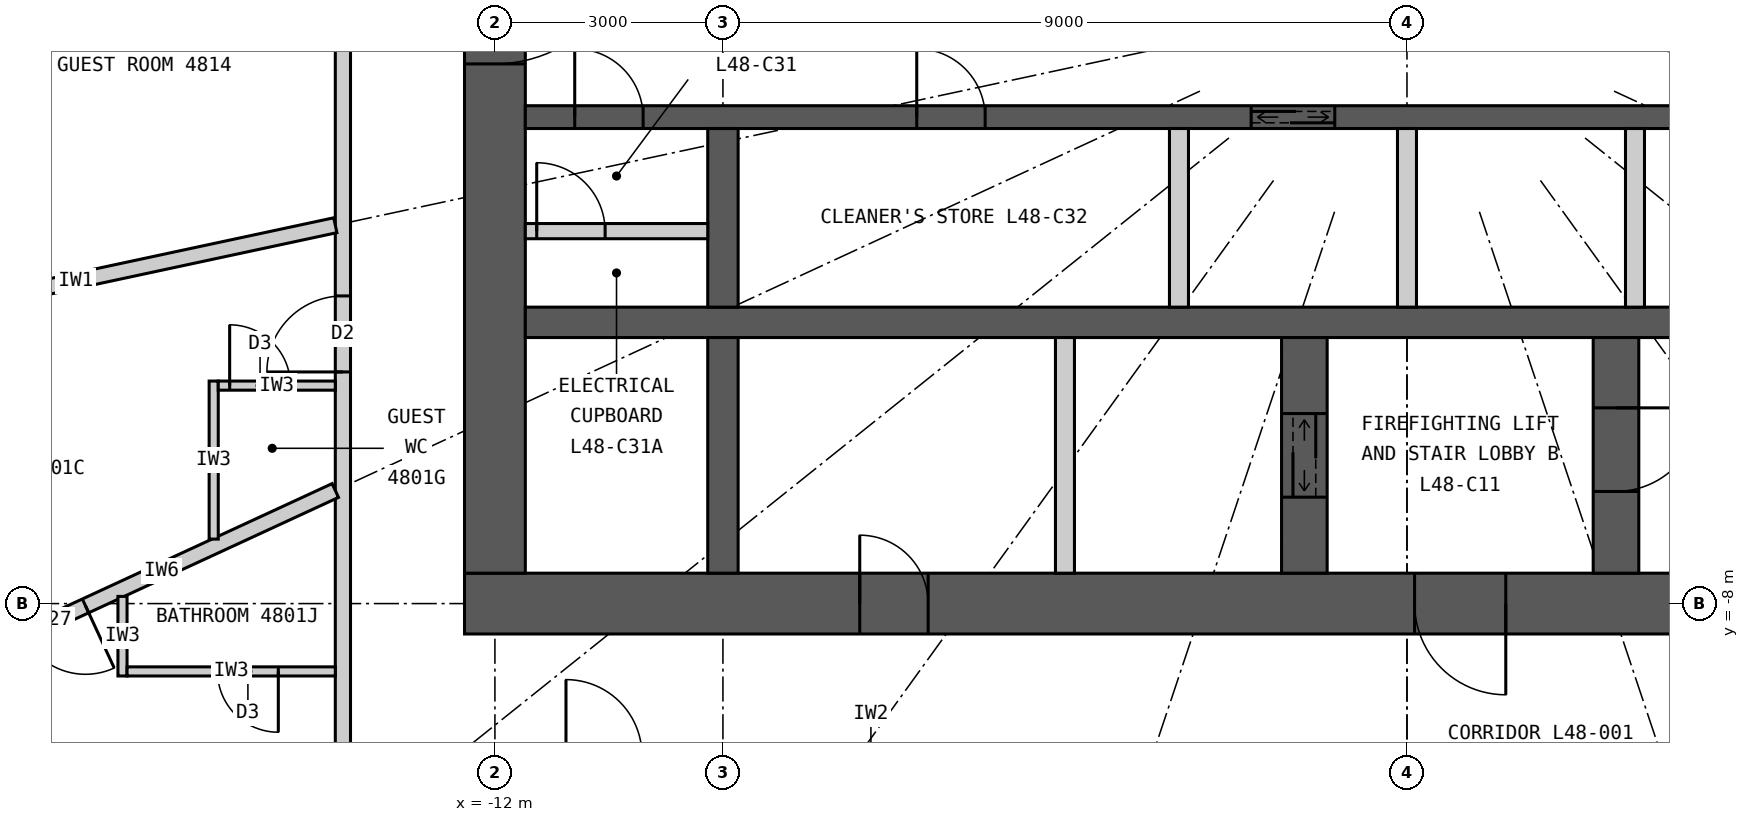
"""IFC4 building model, lengths in metres.
Left out: names, types, materials, properties, quantities, classifications, styles, units other than length and angle.
Written with IfcOpenShell. Run it as: python <this file> out.ifc"""

import sys

from ifc_helpers import new_model, si_unit, direction, frame, frame_2d, origin, place, context, subcontext, project, spatial, rectangle, extrude, element, fill, save


model = new_model("IFC4")
c1 = context("Model", 3, precision=1e-05, world=origin(), true_north=direction((0.0, 1.0)))
c2 = subcontext(c1, "Body", "Model", "MODEL_VIEW")
j1 = project(units=[si_unit("LENGTHUNIT", "METRE"), si_unit("PLANEANGLEUNIT", "RADIAN")], contexts=[c1])
p1 = place(None, origin())
s1 = spatial("IfcSite", under=j1, at=p1, CompositionType="ELEMENT")
p2 = place(p1, origin())
s2 = spatial("IfcBuilding", under=s1, at=p2, CompositionType="ELEMENT")
p3 = place(p2, frame((0.0, 0.0, 179.7)))
s3 = spatial("IfcBuildingStorey", under=s2, at=p3, CompositionType="ELEMENT", Elevation=179.7)
p4 = place(p3, frame((12.4, -8.0, 0.0), z_axis=(0.0, 0.0, 1.0), x_axis=(-1.0, 0.0, 0.0)))
e1 = element("IfcWall", 1, at=p4, inside=s3, PredefinedType="SHEAR", context=c2, shape_type="SweptSolid", body=[
    extrude(rectangle(XDim=24.8, YDim=0.8, at=frame_2d((12.4, 0.0))), origin(), (0.0, 0.0, 1.0), 3.3),
])
p5 = place(p4, frame((11.1, 0.0, 0.0)))
e2 = element("IfcOpeningElement", 2, at=p5, cuts=e1, PredefinedType="OPENING", context=c2, shape_type="SweptSolid", body=[
    extrude(rectangle(XDim=1.2, YDim=2.2, at=frame_2d((0.6, 1.1))), frame((0.0, 0.41, 0.0), z_axis=(0.0, -1.0, 0.0), x_axis=(1.0, 0.0, 0.0)), (0.0, 0.0, 1.0), 0.82),
])
p6 = place(p4, frame((18.7, 0.0, 0.0)))
e3 = element("IfcOpeningElement", 3, at=p6, cuts=e1, PredefinedType="OPENING", context=c2, shape_type="SweptSolid", body=[
    extrude(rectangle(XDim=0.9, YDim=2.2, at=frame_2d((0.45, 1.1))), frame((0.0, 0.41, 0.0), z_axis=(0.0, -1.0, 0.0), x_axis=(1.0, 0.0, 0.0)), (0.0, 0.0, 1.0), 0.82),
])
p7 = place(p3, frame((-12.0, 7.6, 0.0), z_axis=(0.0, 0.0, 1.0), x_axis=(0.0, -1.0, 0.0)))
e4 = element("IfcWall", 4, at=p7, inside=s3, PredefinedType="SHEAR", context=c2, shape_type="SweptSolid", body=[
    extrude(rectangle(XDim=15.2, YDim=0.8, at=frame_2d((7.6, 0.0))), origin(), (0.0, 0.0, 1.0), 3.3),
])
p8 = place(p7, frame((6.7, 0.0, 0.0)))
e5 = element("IfcOpeningElement", 5, at=p8, cuts=e4, PredefinedType="OPENING", context=c2, shape_type="SweptSolid", body=[
    extrude(rectangle(XDim=1.8, YDim=2.2, at=frame_2d((0.9, 1.1))), frame((0.0, 0.41, 0.0), z_axis=(0.0, -1.0, 0.0), x_axis=(1.0, 0.0, 0.0)), (0.0, 0.0, 1.0), 0.82),
])
p9 = place(p3, frame((-11.6, -4.3, 0.0), z_axis=(0.0, 0.0, 1.0), x_axis=(1.0, 0.0, 0.0)))
e6 = element("IfcWall", 6, at=p9, inside=s3, PredefinedType="SHEAR", context=c2, shape_type="SweptSolid", body=[
    extrude(rectangle(XDim=23.2, YDim=0.4, at=frame_2d((11.6, 0.0))), origin(), (0.0, 0.0, 1.0), 3.3),
])
p10 = place(p3, frame((-11.6, -1.6, 0.0), z_axis=(0.0, 0.0, 1.0), x_axis=(1.0, 0.0, 0.0)))
e7 = element("IfcWall", 7, at=p10, inside=s3, PredefinedType="SHEAR", context=c2, shape_type="SweptSolid", body=[
    extrude(rectangle(XDim=23.2, YDim=0.3, at=frame_2d((11.6, 0.0))), origin(), (0.0, 0.0, 1.0), 3.3),
])
p11 = place(p10, frame((9.55, 0.0, 0.0)))
e8 = element("IfcOpeningElement", 8, at=p11, cuts=e7, PredefinedType="OPENING", context=c2, shape_type="SweptSolid", body=[
    extrude(rectangle(XDim=1.1, YDim=2.2, at=frame_2d((0.55, 1.1))), frame((0.0, 0.16, 0.0), z_axis=(0.0, -1.0, 0.0), x_axis=(1.0, 0.0, 0.0)), (0.0, 0.0, 1.0), 0.32),
])
p12 = place(p10, frame((15.3, 0.0, 0.0)))
e9 = element("IfcOpeningElement", 9, at=p12, cuts=e7, PredefinedType="OPENING", context=c2, shape_type="SweptSolid", body=[
    extrude(rectangle(XDim=1.6, YDim=2.4, at=frame_2d((0.8, 1.2))), frame((0.0, 0.16, 0.0), z_axis=(0.0, -1.0, 0.0), x_axis=(1.0, 0.0, 0.0)), (0.0, 0.0, 1.0), 0.32),
])
p13 = place(p10, frame((0.65, 0.0, 0.0)))
e10 = element("IfcOpeningElement", 10, at=p13, cuts=e7, PredefinedType="OPENING", context=c2, shape_type="SweptSolid", body=[
    extrude(rectangle(XDim=0.9, YDim=2.2, at=frame_2d((0.45, 1.1))), frame((0.0, 0.16, 0.0), z_axis=(0.0, -1.0, 0.0), x_axis=(1.0, 0.0, 0.0)), (0.0, 0.0, 1.0), 0.32),
])
p14 = place(p10, frame((5.15, 0.0, 0.0)))
e11 = element("IfcOpeningElement", 11, at=p14, cuts=e7, PredefinedType="OPENING", context=c2, shape_type="SweptSolid", body=[
    extrude(rectangle(XDim=0.9, YDim=2.2, at=frame_2d((0.45, 1.1))), frame((0.0, 0.16, 0.0), z_axis=(0.0, -1.0, 0.0), x_axis=(1.0, 0.0, 0.0)), (0.0, 0.0, 1.0), 0.32),
])
p15 = place(p10, frame((21.65, 0.0, 0.0)))
e12 = element("IfcOpeningElement", 12, at=p15, cuts=e7, PredefinedType="OPENING", context=c2, shape_type="SweptSolid", body=[
    extrude(rectangle(XDim=0.9, YDim=2.2, at=frame_2d((0.45, 1.1))), frame((0.0, 0.16, 0.0), z_axis=(0.0, -1.0, 0.0), x_axis=(1.0, 0.0, 0.0)), (0.0, 0.0, 1.0), 0.32),
])
p16 = place(p3, frame((-9.0, -4.1, 0.0), z_axis=(0.0, 0.0, 1.0), x_axis=(0.0, 1.0, 0.0)))
e13 = element("IfcWall", 13, at=p16, inside=s3, PredefinedType="SHEAR", context=c2, shape_type="SweptSolid", body=[
    extrude(rectangle(XDim=2.35, YDim=0.4, at=frame_2d((1.175, 0.0))), origin(), (0.0, 0.0, 1.0), 3.3),
])
p17 = place(p3, frame((-9.0, -7.6, 0.0), z_axis=(0.0, 0.0, 1.0), x_axis=(0.0, 1.0, 0.0)))
e14 = element("IfcWall", 14, at=p17, inside=s3, PredefinedType="SHEAR", context=c2, shape_type="SweptSolid", body=[
    extrude(rectangle(XDim=3.1, YDim=0.4, at=frame_2d((1.55, 0.0))), origin(), (0.0, 0.0, 1.0), 3.3),
])
p18 = place(p3, frame((2.75, -7.6, 0.0), z_axis=(0.0, 0.0, 1.0), x_axis=(0.0, 1.0, 0.0)))
e15 = element("IfcWall", 15, at=p18, inside=s3, PredefinedType="SHEAR", context=c2, shape_type="SweptSolid", body=[
    extrude(rectangle(XDim=3.1, YDim=0.6, at=frame_2d((1.55, 0.0))), origin(), (0.0, 0.0, 1.0), 3.3),
])
p19 = place(p18, frame((1.075, 0.0, 0.0)))
e16 = element("IfcOpeningElement", 16, at=p19, cuts=e15, PredefinedType="OPENING", context=c2, shape_type="SweptSolid", body=[
    extrude(rectangle(XDim=1.1, YDim=2.2, at=frame_2d((0.55, 1.1))), frame((0.0, 0.31, 0.0), z_axis=(0.0, -1.0, 0.0), x_axis=(1.0, 0.0, 0.0)), (0.0, 0.0, 1.0), 0.62),
])
p20 = place(p3, frame((-1.35, -7.6, 0.0), z_axis=(0.0, 0.0, 1.0), x_axis=(0.0, 1.0, 0.0)))
e17 = element("IfcWall", 17, at=p20, inside=s3, PredefinedType="SHEAR", context=c2, shape_type="SweptSolid", body=[
    extrude(rectangle(XDim=3.1, YDim=0.6, at=frame_2d((1.55, 0.0))), origin(), (0.0, 0.0, 1.0), 3.3),
])
p21 = place(p20, frame((1.0, 0.0, 0.0)))
e18 = element("IfcOpeningElement", 18, at=p21, cuts=e17, PredefinedType="OPENING", context=c2, shape_type="SweptSolid", body=[
    extrude(rectangle(XDim=1.1, YDim=2.2, at=frame_2d((0.55, 1.1))), frame((0.0, 0.31, 0.0), z_axis=(0.0, -1.0, 0.0), x_axis=(1.0, 0.0, 0.0)), (0.0, 0.0, 1.0), 0.62),
])
p22 = place(p3, frame((-4.5, -7.6, 0.0), z_axis=(0.0, 0.0, 1.0), x_axis=(0.0, 1.0, 0.0)))
e19 = element("IfcWall", 19, at=p22, inside=s3, PredefinedType="PARTITIONING", context=c2, shape_type="SweptSolid", body=[
    extrude(rectangle(XDim=3.1, YDim=0.25, at=frame_2d((1.55, 0.0))), origin(), (0.0, 0.0, 1.0), 3.3),
])
for number, where, z_axis, x_axis in (
    (20, (-3.0, -4.1, 0.0), (0.0, 0.0, 1.0), (0.0, 1.0, 0.0)),
    (21, (0.0, -4.1, 0.0), (0.0, 0.0, 1.0), (0.0, 1.0, 0.0)),
    (22, (3.0, -4.1, 0.0), (0.0, 0.0, 1.0), (0.0, 1.0, 0.0)),
):
    element("IfcWall", number, at=place(p3, frame(where, z_axis=z_axis, x_axis=x_axis)), inside=s3, PredefinedType="PARTITIONING", context=c2, shape_type="SweptSolid", body=[
        extrude(rectangle(XDim=2.35, YDim=0.25, at=frame_2d((1.175, 0.0))), origin(), (0.0, 0.0, 1.0), 3.3),
    ])
p23 = place(p3, frame((-19.772, -9.132, 0.0), z_axis=(0.0, 0.0, 1.0), x_axis=(0.700727467776, -0.71342905457, 0.0)))
e23 = element("IfcWall", 23, at=p23, inside=s3, PredefinedType="ELEMENTEDWALL", context=c2, shape_type="SweptSolid", body=[
    extrude(rectangle(XDim=5.247, YDim=0.15, at=frame_2d((2.624, 0.0))), origin(), (0.0, 0.0, 1.0), 3.12),
])
p24 = place(p23, frame((0.924, 0.0, 0.9)))
e24 = element("IfcOpeningElement", 24, at=p24, cuts=e23, PredefinedType="OPENING", context=c2, shape_type="SweptSolid", body=[
    extrude(rectangle(XDim=1.4, YDim=1.9, at=frame_2d((0.7, 0.95))), frame((0.0, 0.085, 0.0), z_axis=(0.0, -1.0, 0.0), x_axis=(1.0, 0.0, 0.0)), (0.0, 0.0, 1.0), 0.17),
])
p25 = place(p23, frame((2.924, 0.0, 0.9)))
e25 = element("IfcOpeningElement", 25, at=p25, cuts=e23, PredefinedType="OPENING", context=c2, shape_type="SweptSolid", body=[
    extrude(rectangle(XDim=1.4, YDim=1.9, at=frame_2d((0.7, 0.95))), frame((0.0, 0.085, 0.0), z_axis=(0.0, -1.0, 0.0), x_axis=(1.0, 0.0, 0.0)), (0.0, 0.0, 1.0), 0.17),
])
p26 = place(p3, frame((-14.0, 9.9, 0.0), z_axis=(0.0, 0.0, 1.0), x_axis=(0.0, -1.0, 0.0)))
e26 = element("IfcWall", 26, at=p26, inside=s3, PredefinedType="PARTITIONING", context=c2, shape_type="SweptSolid", body=[
    extrude(rectangle(XDim=19.8, YDim=0.2, at=frame_2d((9.9, 0.0))), origin(), (0.0, 0.0, 1.0), 3.12),
])
p27 = place(p26, frame((13.853, 0.0, 0.0)))
e27 = element("IfcOpeningElement", 27, at=p27, cuts=e26, PredefinedType="OPENING", context=c2, shape_type="SweptSolid", body=[
    extrude(rectangle(XDim=1.0, YDim=2.2, at=frame_2d((0.5, 1.1))), frame((0.0, 0.11, 0.0), z_axis=(0.0, -1.0, 0.0), x_axis=(1.0, 0.0, 0.0)), (0.0, 0.0, 1.0), 0.22),
])
p28 = place(p26, frame((1.1, 0.0, 0.0)))
e28 = element("IfcOpeningElement", 28, at=p28, cuts=e26, PredefinedType="OPENING", context=c2, shape_type="SweptSolid", body=[
    extrude(rectangle(XDim=1.0, YDim=2.2, at=frame_2d((0.5, 1.1))), frame((0.0, 0.11, 0.0), z_axis=(0.0, -1.0, 0.0), x_axis=(1.0, 0.0, 0.0)), (0.0, 0.0, 1.0), 0.22),
])
p29 = place(p26, frame((3.688, 0.0, 0.0)))
e29 = element("IfcOpeningElement", 29, at=p29, cuts=e26, PredefinedType="OPENING", context=c2, shape_type="SweptSolid", body=[
    extrude(rectangle(XDim=1.0, YDim=2.2, at=frame_2d((0.5, 1.1))), frame((0.0, 0.11, 0.0), z_axis=(0.0, -1.0, 0.0), x_axis=(1.0, 0.0, 0.0)), (0.0, 0.0, 1.0), 0.22),
])
p30 = place(p26, frame((8.719, 0.0, 0.0)))
e30 = element("IfcOpeningElement", 30, at=p30, cuts=e26, PredefinedType="OPENING", context=c2, shape_type="SweptSolid", body=[
    extrude(rectangle(XDim=1.0, YDim=2.2, at=frame_2d((0.5, 1.1))), frame((0.0, 0.11, 0.0), z_axis=(0.0, -1.0, 0.0), x_axis=(1.0, 0.0, 0.0)), (0.0, 0.0, 1.0), 0.22),
])
p31 = place(p3, frame((-14.1, -3.022, 0.0), z_axis=(0.0, 0.0, 1.0), x_axis=(-0.977790639684, -0.209584028367, 0.0)))
e31 = element("IfcWall", 31, at=p31, inside=s3, PredefinedType="PARTITIONING", context=c2, shape_type="SweptSolid", body=[
    extrude(rectangle(XDim=6.98, YDim=0.2, at=frame_2d((3.49, 0.0))), origin(), (0.0, 0.0, 1.0), 2.27),
])
p32 = place(p3, frame((-14.1, -6.512, 0.0), z_axis=(0.0, 0.0, 1.0), x_axis=(-0.907823150669, -0.419353224751, 0.0)))
e32 = element("IfcWall", 32, at=p32, inside=s3, PredefinedType="PARTITIONING", context=c2, shape_type="SweptSolid", body=[
    extrude(rectangle(XDim=5.037, YDim=0.2, at=frame_2d((2.519, 0.0))), origin(), (0.0, 0.0, 1.0), 2.22),
])
p33 = place(p32, frame((3.62, 0.0, 0.0)))
e33 = element("IfcOpeningElement", 33, at=p33, cuts=e32, PredefinedType="OPENING", context=c2, shape_type="SweptSolid", body=[
    extrude(rectangle(XDim=0.9, YDim=2.1, at=frame_2d((0.45, 1.05))), frame((0.0, 0.11, 0.0), z_axis=(0.0, -1.0, 0.0), x_axis=(1.0, 0.0, 0.0)), (0.0, 0.0, 1.0), 0.22),
])
p34 = place(p3, frame((-15.7, -7.152, 0.0), z_axis=(0.0, 0.0, 1.0), x_axis=(0.0, 1.0, 0.0)))
e34 = element("IfcWall", 34, at=p34, inside=s3, PredefinedType="PARTITIONING", context=c2, shape_type="SweptSolid", body=[
    extrude(rectangle(XDim=2.079, YDim=0.12, at=frame_2d((1.04, 0.0))), origin(), (0.0, 0.0, 1.0), 3.12),
])
p35 = place(p3, frame((-14.1, -5.133, 0.0), z_axis=(0.0, 0.0, 1.0), x_axis=(-1.0, 0.0, 0.0)))
e35 = element("IfcWall", 35, at=p35, inside=s3, PredefinedType="PARTITIONING", context=c2, shape_type="SweptSolid", body=[
    extrude(rectangle(XDim=1.54, YDim=0.12, at=frame_2d((0.77, 0.0))), origin(), (0.0, 0.0, 1.0), 3.12),
])
p36 = place(p35, frame((0.59, 0.0, 0.0)))
e36 = element("IfcOpeningElement", 36, at=p36, cuts=e35, PredefinedType="OPENING", context=c2, shape_type="SweptSolid", body=[
    extrude(rectangle(XDim=0.8, YDim=2.1, at=frame_2d((0.4, 1.05))), frame((0.0, 0.07, 0.0), z_axis=(0.0, -1.0, 0.0), x_axis=(1.0, 0.0, 0.0)), (0.0, 0.0, 1.0), 0.14),
])
p37 = place(p3, frame((-16.9, -7.906, 0.0), z_axis=(0.0, 0.0, 1.0), x_axis=(0.0, -1.0, 0.0)))
e37 = element("IfcWall", 37, at=p37, inside=s3, PredefinedType="PARTITIONING", context=c2, shape_type="SweptSolid", body=[
    extrude(rectangle(XDim=1.047, YDim=0.12, at=frame_2d((0.523, 0.0))), origin(), (0.0, 0.0, 1.0), 3.12),
])
p38 = place(p3, frame((-14.1, -8.893, 0.0), z_axis=(0.0, 0.0, 1.0), x_axis=(-1.0, 0.0, 0.0)))
e38 = element("IfcWall", 38, at=p38, inside=s3, PredefinedType="PARTITIONING", context=c2, shape_type="SweptSolid", body=[
    extrude(rectangle(XDim=2.74, YDim=0.12, at=frame_2d((1.37, 0.0))), origin(), (0.0, 0.0, 1.0), 3.12),
])
p39 = place(p38, frame((0.75, 0.0, 0.0)))
e39 = element("IfcOpeningElement", 39, at=p39, cuts=e38, PredefinedType="OPENING", context=c2, shape_type="SweptSolid", body=[
    extrude(rectangle(XDim=0.8, YDim=2.1, at=frame_2d((0.4, 1.05))), frame((0.0, 0.07, 0.0), z_axis=(0.0, -1.0, 0.0), x_axis=(1.0, 0.0, 0.0)), (0.0, 0.0, 1.0), 0.14),
])
p40 = place(p3, frame((-11.6, -3.1, 0.0), z_axis=(0.0, 0.0, 1.0), x_axis=(1.0, 0.0, 0.0)))
e40 = element("IfcWall", 40, at=p40, inside=s3, PredefinedType="PARTITIONING", context=c2, shape_type="SweptSolid", body=[
    extrude(rectangle(XDim=2.4, YDim=0.2, at=frame_2d((1.2, 0.0))), origin(), (0.0, 0.0, 1.0), 3.12),
])
p41 = place(p40, frame((0.15, 0.0, 0.0)))
e41 = element("IfcOpeningElement", 41, at=p41, cuts=e40, PredefinedType="OPENING", context=c2, shape_type="SweptSolid", body=[
    extrude(rectangle(XDim=0.9, YDim=2.2, at=frame_2d((0.45, 1.1))), frame((0.0, 0.11, 0.0), z_axis=(0.0, -1.0, 0.0), x_axis=(1.0, 0.0, 0.0)), (0.0, 0.0, 1.0), 0.22),
])
p42 = place(p36, origin())
e42 = element("IfcDoor", 42, at=p42, inside=s3, OperationType="SINGLE_SWING_RIGHT", PredefinedType="DOOR", context=c2, shape_type="SweptSolid", body=[
    extrude(rectangle(XDim=0.8, YDim=2.1, at=frame_2d((0.4, 1.05))), frame((0.0, 0.025, 0.0), z_axis=(0.0, -1.0, 0.0), x_axis=(1.0, 0.0, 0.0)), (0.0, 0.0, 1.0), 0.05),
])
fill(e36, e42)
p43 = place(p27, origin())
e43 = element("IfcDoor", 43, at=p43, inside=s3, OperationType="SINGLE_SWING_RIGHT", PredefinedType="DOOR", context=c2, shape_type="SweptSolid", body=[
    extrude(rectangle(XDim=1.0, YDim=2.2, at=frame_2d((0.5, 1.1))), frame((0.0, 0.025, 0.0), z_axis=(0.0, -1.0, 0.0), x_axis=(1.0, 0.0, 0.0)), (0.0, 0.0, 1.0), 0.05),
])
fill(e27, e43)
p44 = place(p39, origin())
e44 = element("IfcDoor", 44, at=p44, inside=s3, OperationType="SINGLE_SWING_LEFT", PredefinedType="DOOR", context=c2, shape_type="SweptSolid", body=[
    extrude(rectangle(XDim=0.8, YDim=2.1, at=frame_2d((0.4, 1.05))), frame((0.0, 0.025, 0.0), z_axis=(0.0, -1.0, 0.0), x_axis=(1.0, 0.0, 0.0)), (0.0, 0.0, 1.0), 0.05),
])
fill(e39, e44)
p45 = place(p33, origin())
e45 = element("IfcDoor", 45, at=p45, inside=s3, OperationType="SINGLE_SWING_LEFT", PredefinedType="DOOR", context=c2, shape_type="SweptSolid", body=[
    extrude(rectangle(XDim=0.9, YDim=2.1, at=frame_2d((0.45, 1.05))), frame((0.0, 0.025, 0.0), z_axis=(0.0, -1.0, 0.0), x_axis=(1.0, 0.0, 0.0)), (0.0, 0.0, 1.0), 0.05),
])
fill(e33, e45)
p46 = place(p5, origin())
e46 = element("IfcDoor", 46, at=p46, inside=s3, OperationType="SINGLE_SWING_LEFT", PredefinedType="DOOR", context=c2, shape_type="SweptSolid", body=[
    extrude(rectangle(XDim=1.2, YDim=2.2, at=frame_2d((0.6, 1.1))), frame((0.0, 0.025, 0.0), z_axis=(0.0, -1.0, 0.0), x_axis=(1.0, 0.0, 0.0)), (0.0, 0.0, 1.0), 0.05),
])
fill(e2, e46)
p47 = place(p19, origin())
e47 = element("IfcDoor", 47, at=p47, inside=s3, OperationType="SINGLE_SWING_RIGHT", PredefinedType="DOOR", context=c2, shape_type="SweptSolid", body=[
    extrude(rectangle(XDim=1.1, YDim=2.2, at=frame_2d((0.55, 1.1))), frame((0.0, 0.025, 0.0), z_axis=(0.0, -1.0, 0.0), x_axis=(1.0, 0.0, 0.0)), (0.0, 0.0, 1.0), 0.05),
])
fill(e16, e47)
p48 = place(p21, origin())
e48 = element("IfcDoor", 48, at=p48, inside=s3, OperationType="DOUBLE_DOOR_SLIDING", PredefinedType="DOOR", context=c2, shape_type="SweptSolid", body=[
    extrude(rectangle(XDim=1.1, YDim=2.2, at=frame_2d((0.55, 1.1))), frame((0.0, 0.025, 0.0), z_axis=(0.0, -1.0, 0.0), x_axis=(1.0, 0.0, 0.0)), (0.0, 0.0, 1.0), 0.05),
])
fill(e18, e48)
p49 = place(p6, origin())
e49 = element("IfcDoor", 49, at=p49, inside=s3, OperationType="SINGLE_SWING_RIGHT", PredefinedType="DOOR", context=c2, shape_type="SweptSolid", body=[
    extrude(rectangle(XDim=0.9, YDim=2.2, at=frame_2d((0.45, 1.1))), frame((0.0, 0.025, 0.0), z_axis=(0.0, -1.0, 0.0), x_axis=(1.0, 0.0, 0.0)), (0.0, 0.0, 1.0), 0.05),
])
fill(e3, e49)
p50 = place(p11, origin())
e50 = element("IfcDoor", 50, at=p50, inside=s3, OperationType="DOUBLE_DOOR_SLIDING", PredefinedType="DOOR", context=c2, shape_type="SweptSolid", body=[
    extrude(rectangle(XDim=1.1, YDim=2.2, at=frame_2d((0.55, 1.1))), frame((0.0, 0.025, 0.0), z_axis=(0.0, -1.0, 0.0), x_axis=(1.0, 0.0, 0.0)), (0.0, 0.0, 1.0), 0.05),
])
fill(e8, e50)
p51 = place(p41, origin())
e51 = element("IfcDoor", 51, at=p51, inside=s3, OperationType="SINGLE_SWING_LEFT", PredefinedType="DOOR", context=c2, shape_type="SweptSolid", body=[
    extrude(rectangle(XDim=0.9, YDim=2.2, at=frame_2d((0.45, 1.1))), frame((0.0, 0.025, 0.0), z_axis=(0.0, -1.0, 0.0), x_axis=(1.0, 0.0, 0.0)), (0.0, 0.0, 1.0), 0.05),
])
fill(e41, e51)
p52 = place(p13, origin())
e52 = element("IfcDoor", 52, at=p52, inside=s3, OperationType="SINGLE_SWING_LEFT", PredefinedType="DOOR", context=c2, shape_type="SweptSolid", body=[
    extrude(rectangle(XDim=0.9, YDim=2.2, at=frame_2d((0.45, 1.1))), frame((0.0, 0.025, 0.0), z_axis=(0.0, -1.0, 0.0), x_axis=(1.0, 0.0, 0.0)), (0.0, 0.0, 1.0), 0.05),
])
fill(e10, e52)
p53 = place(p14, origin())
e53 = element("IfcDoor", 53, at=p53, inside=s3, OperationType="SINGLE_SWING_LEFT", PredefinedType="DOOR", context=c2, shape_type="SweptSolid", body=[
    extrude(rectangle(XDim=0.9, YDim=2.2, at=frame_2d((0.45, 1.1))), frame((0.0, 0.025, 0.0), z_axis=(0.0, -1.0, 0.0), x_axis=(1.0, 0.0, 0.0)), (0.0, 0.0, 1.0), 0.05),
])
fill(e11, e53)
p54 = place(p8, origin())
e54 = element("IfcDoor", 54, at=p54, inside=s3, OperationType="DOUBLE_DOOR_DOUBLE_SWING", PredefinedType="DOOR", context=c2, shape_type="SweptSolid", body=[
    extrude(rectangle(XDim=1.8, YDim=2.2, at=frame_2d((0.9, 1.1))), frame((0.0, 0.025, 0.0), z_axis=(0.0, -1.0, 0.0), x_axis=(1.0, 0.0, 0.0)), (0.0, 0.0, 1.0), 0.05),
])
fill(e5, e54)
save(model, sys.argv[1])
